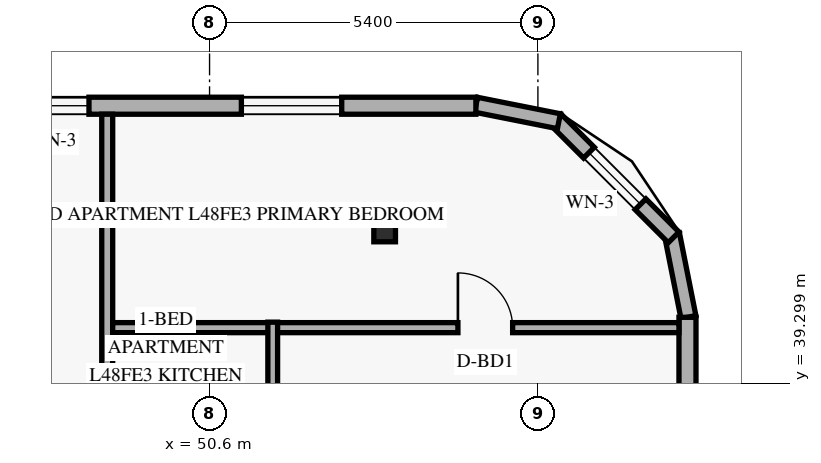
"""IFC4 building model, lengths in metres.
Left out: names, types, materials, properties, quantities, classifications, styles, units other than length and angle.
Written with IfcOpenShell. Run it as: python <this file> out.ifc"""

import sys

from ifc_helpers import new_model, si_unit, direction, frame, frame_2d, origin, origin_2d, place, context, subcontext, project, spatial, rectangle, hollow_rectangle, extrude, element, fill, save


model = new_model("IFC4")
c1 = context("Model", 3, precision=1e-05, world=origin(), true_north=direction((0.0, 1.0)))
c2 = subcontext(c1, "Body", "Model", "MODEL_VIEW")
j1 = project(units=[si_unit("LENGTHUNIT", "METRE"), si_unit("PLANEANGLEUNIT", "RADIAN")], contexts=[c1])
p1 = place(None, origin())
s1 = spatial("IfcSite", under=j1, at=p1, CompositionType="ELEMENT")
p2 = place(p1, origin())
s2 = spatial("IfcBuilding", under=s1, at=p2, CompositionType="ELEMENT")
p3 = place(p2, frame((0.0, 0.0, 184.8)))
s3 = spatial("IfcBuildingStorey", under=s2, at=p3, CompositionType="ELEMENT", Elevation=184.8)
p4 = place(p3, frame((53.375, 41.8, 0.0), z_axis=(0.057888518877, 0.0, 0.998323053617), x_axis=(0.0, 1.0, 0.0)))
e1 = element("IfcColumn", 1, at=p4, inside=s3, PredefinedType="COLUMN", context=c2, shape_type="SweptSolid", body=[
    extrude(hollow_rectangle(XDim=0.356, YDim=0.356, WallThickness=0.016, at=origin_2d()), origin(), (0.0, 0.0, 1.0), 3.606),
])
p5 = place(p3, frame((58.476, 40.384, 0.0), z_axis=(0.0, 0.0, 1.0), x_axis=(-0.19496651342, 0.980809899341, 0.0)))
e2 = element("IfcWall", 2, at=p5, inside=s3, PredefinedType="SOLIDWALL", context=c2, shape_type="SweptSolid", body=[
    extrude(rectangle(XDim=1.389, YDim=0.25, at=frame_2d((0.694, 0.0))), origin(), (0.0, 0.0, 1.0), 3.36),
])
p6 = place(p3, frame((58.232, 41.695, 0.0), z_axis=(0.0, 0.0, 1.0), x_axis=(-0.707106781187, 0.707106781187, 0.0)))
e3 = element("IfcWall", 3, at=p6, inside=s3, PredefinedType="SOLIDWALL", context=c2, shape_type="SweptSolid", body=[
    extrude(rectangle(XDim=2.739, YDim=0.25, at=frame_2d((1.37, 0.0))), origin(), (0.0, 0.0, 1.0), 3.36),
])
p7 = place(p6, frame((0.77, 0.0, 0.85)))
e4 = element("IfcOpeningElement", 4, at=p7, cuts=e3, PredefinedType="OPENING", context=c2, shape_type="SweptSolid", body=[
    extrude(rectangle(XDim=1.2, YDim=1.5, at=frame_2d((0.6, 0.75))), frame((0.0, 0.135, 0.0), z_axis=(0.0, -1.0, 0.0), x_axis=(1.0, 0.0, 0.0)), (0.0, 0.0, 1.0), 0.27),
])
p8 = place(p3, frame((56.345, 43.605, 0.0), z_axis=(0.0, 0.0, 1.0), x_axis=(-0.980809899341, 0.19496651342, 0.0)))
e5 = element("IfcWall", 5, at=p8, inside=s3, PredefinedType="SOLIDWALL", context=c2, shape_type="SweptSolid", body=[
    extrude(rectangle(XDim=1.389, YDim=0.25, at=frame_2d((0.694, 0.0))), origin(), (0.0, 0.0, 1.0), 3.36),
])
p9 = place(p3, frame((58.46, 27.31, 0.0), z_axis=(0.0, 0.0, 1.0), x_axis=(0.0, 1.0, 0.0)))
e6 = element("IfcWall", 6, at=p9, inside=s3, PredefinedType="SOLIDWALL", context=c2, shape_type="SweptSolid", body=[
    extrude(rectangle(XDim=13.07, YDim=0.28, at=frame_2d((6.535, 0.0))), origin(), (0.0, 0.0, 1.0), 3.36),
])
p10 = place(p9, frame((1.195, 0.0, 0.85)))
e7 = element("IfcOpeningElement", 7, at=p10, cuts=e6, PredefinedType="OPENING", context=c2, shape_type="SweptSolid", body=[
    extrude(rectangle(XDim=1.5, YDim=1.55, at=frame_2d((0.75, 0.775))), frame((0.0, 0.15, 0.0), z_axis=(0.0, -1.0, 0.0), x_axis=(1.0, 0.0, 0.0)), (0.0, 0.0, 1.0), 0.3),
])
p11 = place(p9, frame((4.385, 0.0, 0.85)))
e8 = element("IfcOpeningElement", 8, at=p11, cuts=e6, PredefinedType="OPENING", context=c2, shape_type="SweptSolid", body=[
    extrude(rectangle(XDim=1.5, YDim=1.55, at=frame_2d((0.75, 0.775))), frame((0.0, 0.15, 0.0), z_axis=(0.0, -1.0, 0.0), x_axis=(1.0, 0.0, 0.0)), (0.0, 0.0, 1.0), 0.3),
])
p12 = place(p9, frame((8.975, 0.0, 0.85)))
e9 = element("IfcOpeningElement", 9, at=p12, cuts=e6, PredefinedType="OPENING", context=c2, shape_type="SweptSolid", body=[
    extrude(rectangle(XDim=1.5, YDim=1.55, at=frame_2d((0.75, 0.775))), frame((0.0, 0.15, 0.0), z_axis=(0.0, -1.0, 0.0), x_axis=(1.0, 0.0, 0.0)), (0.0, 0.0, 1.0), 0.3),
])
p13 = place(p3, frame((54.98, 43.86, 0.0), z_axis=(0.0, 0.0, 1.0), x_axis=(-1.0, 0.0, 0.0)))
e10 = element("IfcWall", 10, at=p13, inside=s3, PredefinedType="SOLIDWALL", context=c2, shape_type="SweptSolid", body=[
    extrude(rectangle(XDim=33.76, YDim=0.28, at=frame_2d((16.88, 0.0))), origin(), (0.0, 0.0, 1.0), 3.36),
])
p14 = place(p13, frame((28.555, 0.0, 0.85)))
e11 = element("IfcOpeningElement", 11, at=p14, cuts=e10, PredefinedType="OPENING", context=c2, shape_type="SweptSolid", body=[
    extrude(rectangle(XDim=1.65, YDim=1.6, at=frame_2d((0.825, 0.8))), frame((0.0, 0.15, 0.0), z_axis=(0.0, -1.0, 0.0), x_axis=(1.0, 0.0, 0.0)), (0.0, 0.0, 1.0), 0.3),
])
p15 = place(p13, frame((21.67, 0.0, 0.85)))
e12 = element("IfcOpeningElement", 12, at=p15, cuts=e10, PredefinedType="OPENING", context=c2, shape_type="SweptSolid", body=[
    extrude(rectangle(XDim=1.65, YDim=1.6, at=frame_2d((0.825, 0.8))), frame((0.0, 0.15, 0.0), z_axis=(0.0, -1.0, 0.0), x_axis=(1.0, 0.0, 0.0)), (0.0, 0.0, 1.0), 0.3),
])
p16 = place(p13, frame((14.957, 0.0, 0.85)))
e13 = element("IfcOpeningElement", 13, at=p16, cuts=e10, PredefinedType="OPENING", context=c2, shape_type="SweptSolid", body=[
    extrude(rectangle(XDim=1.65, YDim=1.6, at=frame_2d((0.825, 0.8))), frame((0.0, 0.15, 0.0), z_axis=(0.0, -1.0, 0.0), x_axis=(1.0, 0.0, 0.0)), (0.0, 0.0, 1.0), 0.3),
])
p17 = place(p13, frame((9.108, 0.0, 0.85)))
e14 = element("IfcOpeningElement", 14, at=p17, cuts=e10, PredefinedType="OPENING", context=c2, shape_type="SweptSolid", body=[
    extrude(rectangle(XDim=1.65, YDim=1.6, at=frame_2d((0.825, 0.8))), frame((0.0, 0.15, 0.0), z_axis=(0.0, -1.0, 0.0), x_axis=(1.0, 0.0, 0.0)), (0.0, 0.0, 1.0), 0.3),
])
p18 = place(p13, frame((6.363, 0.0, 0.85)))
e15 = element("IfcOpeningElement", 15, at=p18, cuts=e10, PredefinedType="OPENING", context=c2, shape_type="SweptSolid", body=[
    extrude(rectangle(XDim=1.2, YDim=1.5, at=frame_2d((0.6, 0.75))), frame((0.0, 0.15, 0.0), z_axis=(0.0, -1.0, 0.0), x_axis=(1.0, 0.0, 0.0)), (0.0, 0.0, 1.0), 0.3),
])
p19 = place(p13, frame((2.207, 0.0, 0.85)))
e16 = element("IfcOpeningElement", 16, at=p19, cuts=e10, PredefinedType="OPENING", context=c2, shape_type="SweptSolid", body=[
    extrude(rectangle(XDim=1.65, YDim=1.6, at=frame_2d((0.825, 0.8))), frame((0.0, 0.15, 0.0), z_axis=(0.0, -1.0, 0.0), x_axis=(1.0, 0.0, 0.0)), (0.0, 0.0, 1.0), 0.3),
])
p20 = place(p3, frame((48.917, 4.28, 0.0), z_axis=(0.0, 0.0, 1.0), x_axis=(0.0, 1.0, 0.0)))
e17 = element("IfcWall", 17, at=p20, inside=s3, PredefinedType="STANDARD", context=c2, shape_type="SweptSolid", body=[
    extrude(rectangle(XDim=39.44, YDim=0.18, at=frame_2d((19.72, 0.0))), origin(), (0.0, 0.0, 1.0), 2.73),
])
p21 = place(p20, frame((8.52, 0.0, 0.0)))
e18 = element("IfcOpeningElement", 18, at=p21, cuts=e17, PredefinedType="OPENING", context=c2, shape_type="SweptSolid", body=[
    extrude(rectangle(XDim=0.92, YDim=2.15, at=frame_2d((0.46, 1.075))), frame((0.0, 0.1, 0.0), z_axis=(0.0, -1.0, 0.0), x_axis=(1.0, 0.0, 0.0)), (0.0, 0.0, 1.0), 0.2),
])
p22 = place(p20, frame((17.302, 0.0, 0.0)))
e19 = element("IfcOpeningElement", 19, at=p22, cuts=e17, PredefinedType="OPENING", context=c2, shape_type="SweptSolid", body=[
    extrude(rectangle(XDim=0.92, YDim=2.15, at=frame_2d((0.46, 1.075))), frame((0.0, 0.1, 0.0), z_axis=(0.0, -1.0, 0.0), x_axis=(1.0, 0.0, 0.0)), (0.0, 0.0, 1.0), 0.2),
])
p23 = place(p20, frame((29.923, 0.0, 0.0)))
e20 = element("IfcOpeningElement", 20, at=p23, cuts=e17, PredefinedType="OPENING", context=c2, shape_type="SweptSolid", body=[
    extrude(rectangle(XDim=0.92, YDim=2.15, at=frame_2d((0.46, 1.075))), frame((0.0, 0.1, 0.0), z_axis=(0.0, -1.0, 0.0), x_axis=(1.0, 0.0, 0.0)), (0.0, 0.0, 1.0), 0.2),
])
p24 = place(p3, frame((49.007, 40.21, 0.0), z_axis=(0.0, 0.0, 1.0), x_axis=(1.0, 0.0, 0.0)))
e21 = element("IfcWall", 21, at=p24, inside=s3, PredefinedType="PARTITIONING", context=c2, shape_type="SweptSolid", body=[
    extrude(rectangle(XDim=9.313, YDim=0.165, at=frame_2d((4.656, 0.0))), origin(), (0.0, 0.0, 1.0), 2.879),
])
p25 = place(p24, frame((5.677, 0.0, 0.0)))
e22 = element("IfcOpeningElement", 22, at=p25, cuts=e21, PredefinedType="OPENING", context=c2, shape_type="SweptSolid", body=[
    extrude(rectangle(XDim=0.9, YDim=2.14, at=frame_2d((0.45, 1.07))), frame((0.0, 0.093, 0.0), z_axis=(0.0, -1.0, 0.0), x_axis=(1.0, 0.0, 0.0)), (0.0, 0.0, 1.0), 0.185),
])
p26 = place(p3, frame((51.639, 35.413, 0.0), z_axis=(0.0, 0.0, 1.0), x_axis=(0.0, 1.0, 0.0)))
e23 = element("IfcWall", 23, at=p26, inside=s3, PredefinedType="PLUMBINGWALL", context=c2, shape_type="SweptSolid", body=[
    extrude(rectangle(XDim=4.887, YDim=0.16, at=frame_2d((2.443, 0.0))), origin(), (0.0, 0.0, 1.0), 2.73),
])
p27 = place(p26, frame((0.42, 0.0, 0.0)))
e24 = element("IfcOpeningElement", 24, at=p27, cuts=e23, PredefinedType="OPENING", context=c2, shape_type="SweptSolid", body=[
    extrude(rectangle(XDim=0.86, YDim=2.12, at=frame_2d((0.43, 1.06))), frame((0.0, 0.09, 0.0), z_axis=(0.0, -1.0, 0.0), x_axis=(1.0, 0.0, 0.0)), (0.0, 0.0, 1.0), 0.18),
])
p28 = place(p26, frame((2.585, 0.0, 0.0)))
e25 = element("IfcOpeningElement", 25, at=p28, cuts=e23, PredefinedType="OPENING", context=c2, shape_type="SweptSolid", body=[
    extrude(rectangle(XDim=0.88, YDim=2.12, at=frame_2d((0.44, 1.06))), frame((0.0, 0.09, 0.0), z_axis=(0.0, -1.0, 0.0), x_axis=(1.0, 0.0, 0.0)), (0.0, 0.0, 1.0), 0.18),
])
p29 = place(p7, origin())
e26 = element("IfcWindow", 26, at=p29, inside=s3, PartitioningType="SINGLE_PANEL", PredefinedType="WINDOW", context=c2, shape_type="SweptSolid", body=[
    extrude(rectangle(XDim=1.2, YDim=1.5, at=frame_2d((0.6, 0.75))), frame((0.0, 0.03, 0.0), z_axis=(0.0, -1.0, 0.0), x_axis=(1.0, 0.0, 0.0)), (0.0, 0.0, 1.0), 0.06),
])
fill(e4, e26)
p30 = place(p18, origin())
e27 = element("IfcWindow", 27, at=p30, inside=s3, PartitioningType="SINGLE_PANEL", PredefinedType="WINDOW", context=c2, shape_type="SweptSolid", body=[
    extrude(rectangle(XDim=1.2, YDim=1.5, at=frame_2d((0.6, 0.75))), frame((0.0, 0.03, 0.0), z_axis=(0.0, -1.0, 0.0), x_axis=(1.0, 0.0, 0.0)), (0.0, 0.0, 1.0), 0.06),
])
fill(e15, e27)
p31 = place(p19, origin())
e28 = element("IfcWindow", 28, at=p31, inside=s3, PartitioningType="SINGLE_PANEL", PredefinedType="WINDOW", context=c2, shape_type="SweptSolid", body=[
    extrude(rectangle(XDim=1.65, YDim=1.6, at=frame_2d((0.825, 0.8))), frame((0.0, 0.03, 0.0), z_axis=(0.0, -1.0, 0.0), x_axis=(1.0, 0.0, 0.0)), (0.0, 0.0, 1.0), 0.06),
])
fill(e16, e28)
p32 = place(p25, origin())
e29 = element("IfcDoor", 29, at=p32, inside=s3, OperationType="SINGLE_SWING_LEFT", PredefinedType="DOOR", context=c2, shape_type="SweptSolid", body=[
    extrude(rectangle(XDim=0.9, YDim=2.14, at=frame_2d((0.45, 1.07))), frame((0.0, 0.025, 0.0), z_axis=(0.0, -1.0, 0.0), x_axis=(1.0, 0.0, 0.0)), (0.0, 0.0, 1.0), 0.05),
])
fill(e22, e29)
save(model, sys.argv[1])
